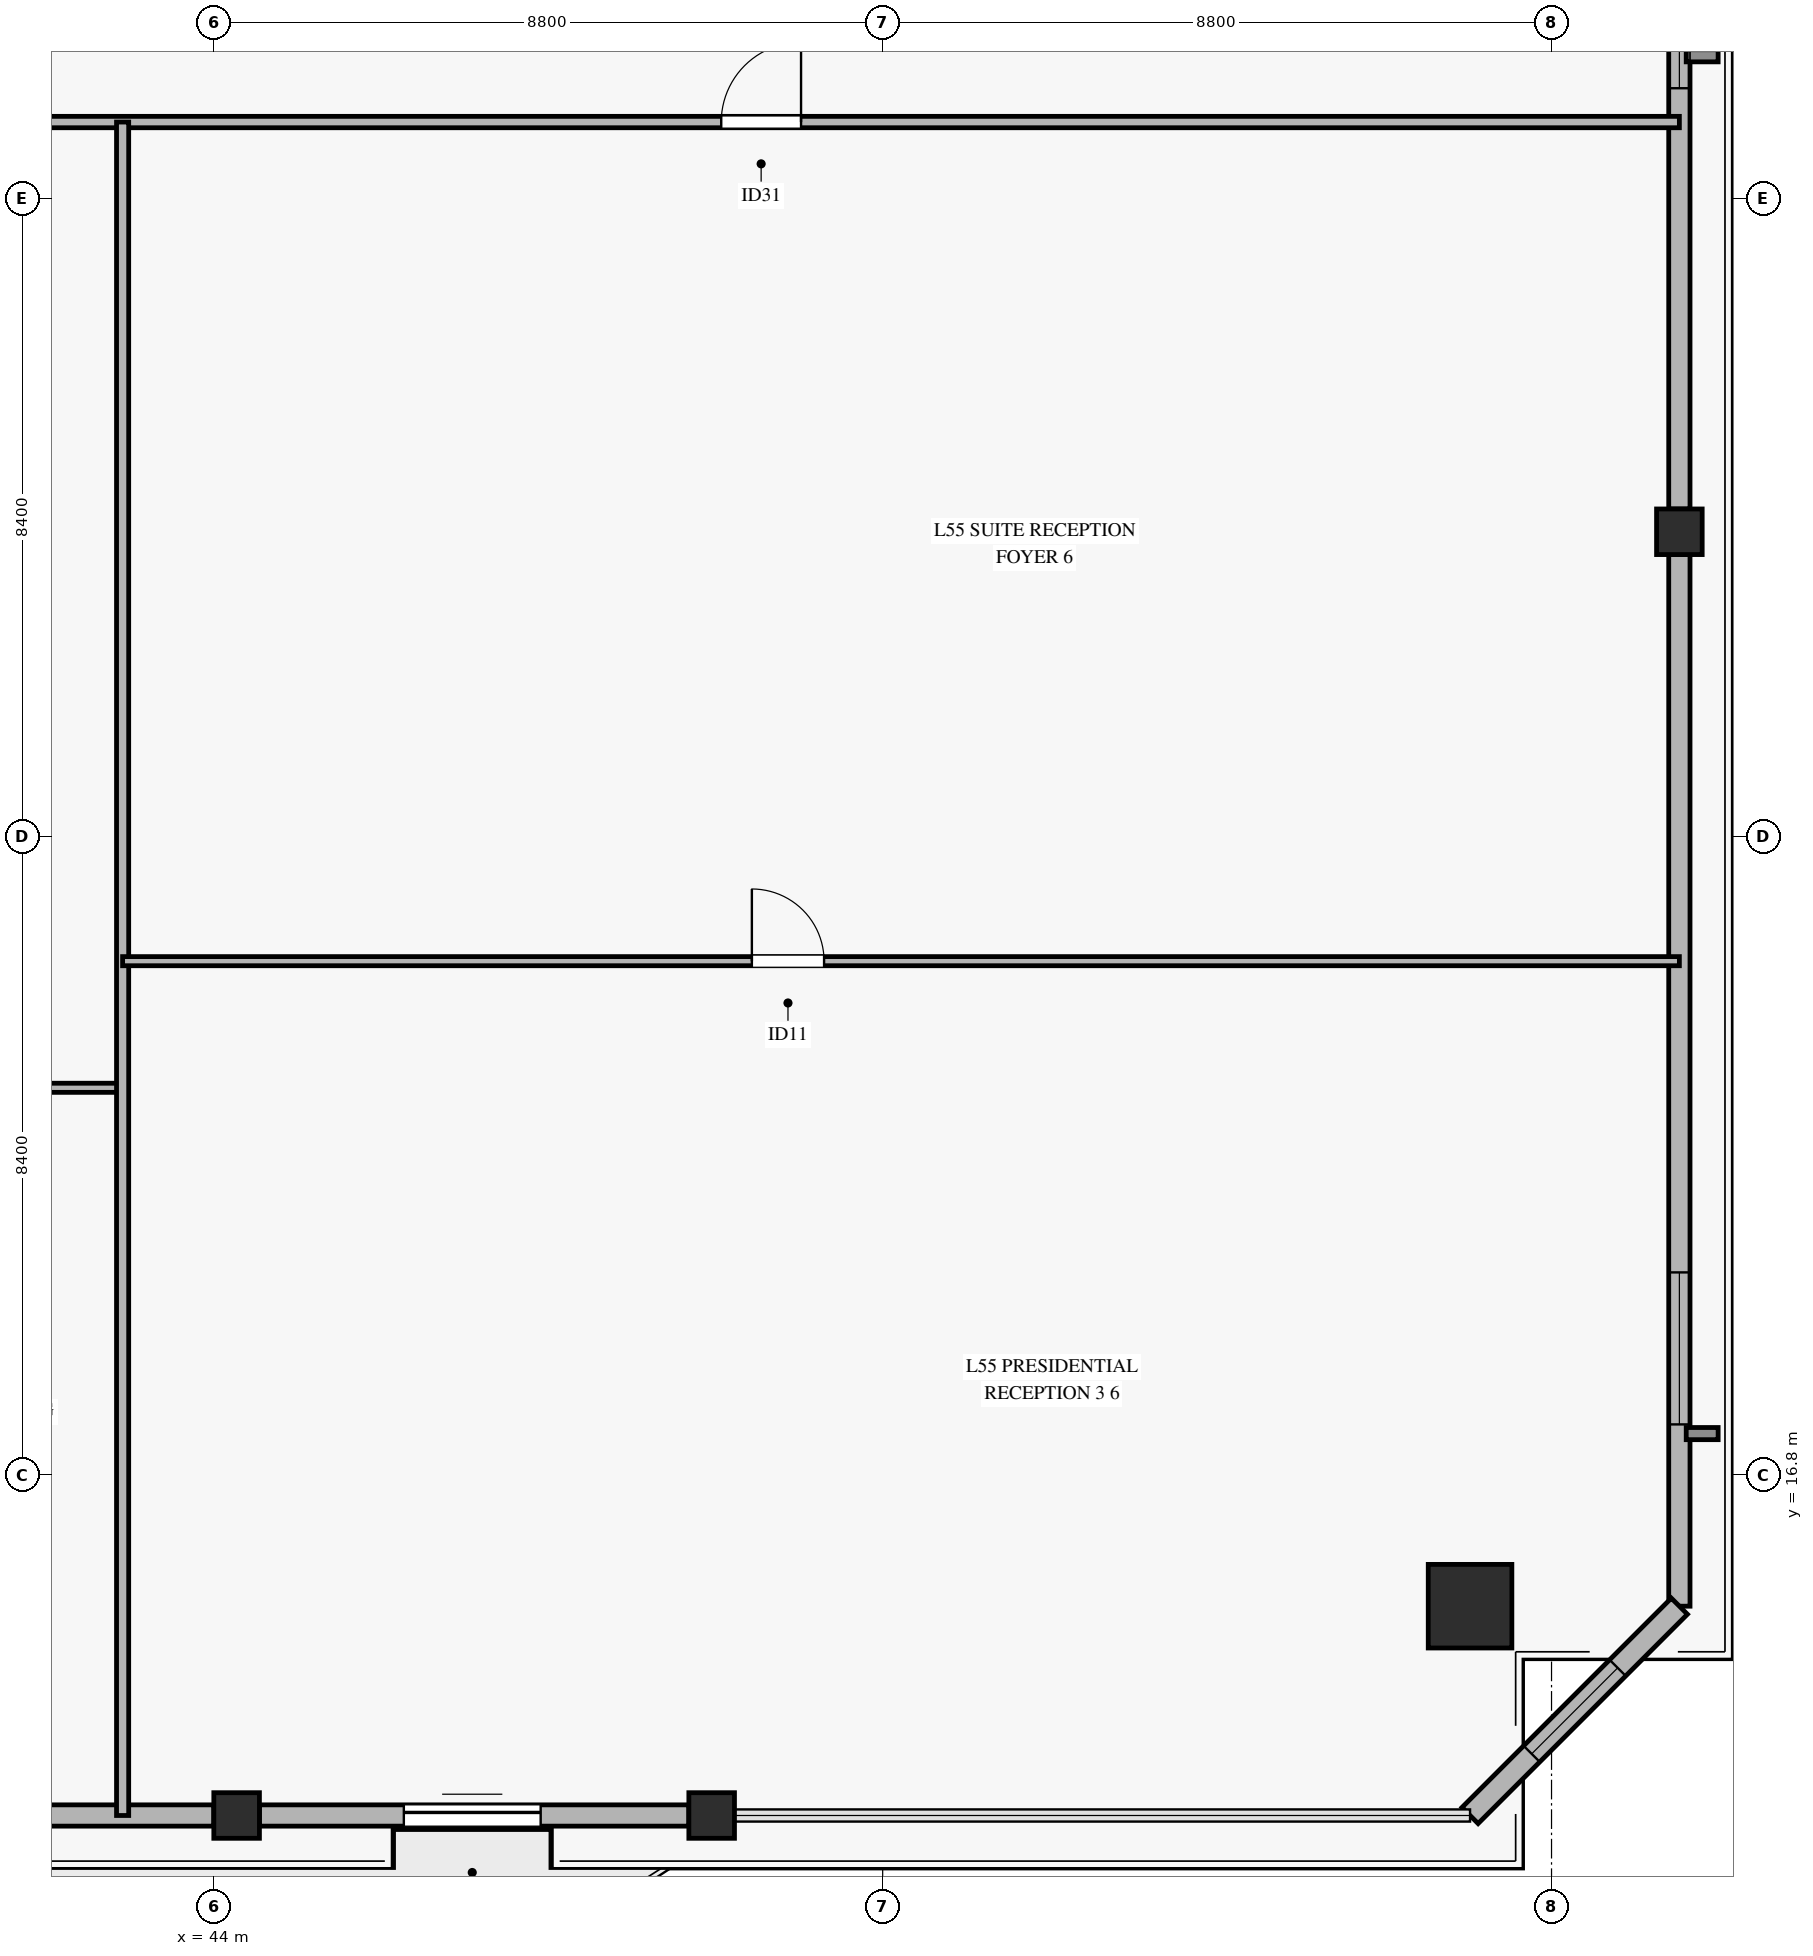
"""IFC4 building model, lengths in metres.
Left out: names, types, materials, properties, quantities, classifications, styles, units other than length and angle.
Written with IfcOpenShell. Run it as: python <this file> out.ifc"""

import sys

from ifc_helpers import new_model, si_unit, direction, frame, frame_2d, origin, origin_2d, place, context, subcontext, project, spatial, rectangle, hollow_rectangle, extrude, source, transform, mapped, element, fill, save


model = new_model("IFC4")
c1 = context("Model", 3, precision=1e-05, world=origin(), true_north=direction((0.0, 1.0)))
c2 = subcontext(c1, "Body", "Model", "MODEL_VIEW")
j1 = project(units=[si_unit("LENGTHUNIT", "METRE"), si_unit("PLANEANGLEUNIT", "RADIAN")], contexts=[c1])
p1 = place(None, origin())
s1 = spatial("IfcSite", under=j1, at=p1, CompositionType="ELEMENT")
p2 = place(p1, origin())
s2 = spatial("IfcBuilding", under=s1, at=p2, CompositionType="ELEMENT")
p3 = place(p2, frame((0.0, 0.0, 216.7)))
s3 = spatial("IfcBuildingStorey", under=s2, at=p3, CompositionType="ELEMENT", Elevation=216.7)
m1 = source(origin(), c2, "Body", "SweptSolid", [
    extrude(hollow_rectangle(XDim=1.1, YDim=1.1, WallThickness=0.05, at=origin_2d()), origin(), (0.0, 0.0, 1.0), 3.24),
])
p4 = place(p3, frame((60.528, 15.072, 0.0), z_axis=(0.0, 0.0, 1.0), x_axis=(1.0, 0.0, 0.0)))
e1 = element("IfcColumn", 1, at=p4, inside=s3, PredefinedType="COLUMN", context=c2, shape_type="MappedRepresentation", body=[
    mapped(m1, transform((0.0, 0.0, 0.0), x_axis=(1.0, 0.0, 0.0), y_axis=(0.0, 1.0, 0.0), z_axis=(0.0, 0.0, 1.0), scale=1.0)),
])
m2 = source(origin(), c2, "Body", "SweptSolid", [
    extrude(hollow_rectangle(XDim=0.6, YDim=0.6, WallThickness=0.028, at=origin_2d()), origin(), (0.0, 0.0, 1.0), 3.24),
])
for number, where, z_axis, x_axis in (
    (2, (44.3, 12.318, 0.0), (0.0, 0.0, 1.0), (1.0, 0.0, 0.0)),
    (3, (50.55, 12.318, 0.0), (0.0, 0.0, 1.0), (1.0, 0.0, 0.0)),
    (4, (63.282, 29.209, 0.0), (0.0, 0.0, 1.0), (1.0, 0.0, 0.0)),
):
    element("IfcColumn", number, at=place(p3, frame(where, z_axis=z_axis, x_axis=x_axis)), inside=s3, PredefinedType="COLUMN", context=c2, shape_type="MappedRepresentation", body=[
        mapped(m2, transform((0.0, 0.0, 0.0), x_axis=(1.0, 0.0, 0.0), y_axis=(0.0, 1.0, 0.0), z_axis=(0.0, 0.0, 1.0), scale=1.0)),
    ])
p5 = place(p3, frame((37.85, 12.318, 0.0), z_axis=(0.0, 0.0, 1.0), x_axis=(1.0, 0.0, 0.0)))
e5 = element("IfcWall", 5, at=p5, inside=s3, PredefinedType="SOLIDWALL", context=c2, shape_type="SweptSolid", body=[
    extrude(rectangle(XDim=6.15, YDim=0.28, at=frame_2d((3.075, 0.0))), origin(), (0.0, 0.0, 1.0), 2.72),
])
p6 = place(p3, frame((44.6, 12.318, 0.0), z_axis=(0.0, 0.0, 1.0), x_axis=(1.0, 0.0, 0.0)))
e6 = element("IfcWall", 6, at=p6, inside=s3, PredefinedType="SOLIDWALL", context=c2, shape_type="SweptSolid", body=[
    extrude(rectangle(XDim=5.65, YDim=0.28, at=frame_2d((2.825, 0.0))), origin(), (0.0, 0.0, 1.0), 2.72),
])
p7 = place(p6, frame((1.9, 0.0, 0.0)))
e7 = element("IfcOpeningElement", 7, at=p7, cuts=e6, PredefinedType="OPENING", context=c2, shape_type="SweptSolid", body=[
    extrude(rectangle(XDim=1.8, YDim=2.25, at=frame_2d((0.9, 1.125))), frame((0.0, 0.15, 0.0), z_axis=(0.0, -1.0, 0.0), x_axis=(1.0, 0.0, 0.0)), (0.0, 0.0, 1.0), 0.3),
])
p8 = place(p3, frame((63.282, 15.072, 0.0), z_axis=(0.0, 0.0, 1.0), x_axis=(0.0, 1.0, 0.0)))
e8 = element("IfcWall", 8, at=p8, inside=s3, PredefinedType="SOLIDWALL", context=c2, shape_type="SweptSolid", body=[
    extrude(rectangle(XDim=13.837, YDim=0.28, at=frame_2d((6.918, 0.0))), origin(), (0.0, 0.0, 1.0), 2.72),
])
p9 = place(p8, frame((2.392, 0.0, 0.45)))
e9 = element("IfcOpeningElement", 9, at=p9, cuts=e8, PredefinedType="OPENING", context=c2, shape_type="SweptSolid", body=[
    extrude(rectangle(XDim=2.0, YDim=2.0, at=frame_2d((1.0, 1.0))), frame((0.0, 0.15, 0.0), z_axis=(0.0, -1.0, 0.0), x_axis=(1.0, 0.0, 0.0)), (0.0, 0.0, 1.0), 0.3),
])
p10 = place(p3, frame((63.282, 29.509, 0.0), z_axis=(0.0, 0.0, 1.0), x_axis=(0.0, 1.0, 0.0)))
e10 = element("IfcWall", 10, at=p10, inside=s3, PredefinedType="SOLIDWALL", context=c2, shape_type="SweptSolid", body=[
    extrude(rectangle(XDim=13.837, YDim=0.28, at=frame_2d((6.918, 0.0))), origin(), (0.0, 0.0, 1.0), 2.72),
])
p11 = place(p10, frame((5.536, 0.0, 0.45)))
e11 = element("IfcOpeningElement", 11, at=p11, cuts=e10, PredefinedType="OPENING", context=c2, shape_type="SweptSolid", body=[
    extrude(rectangle(XDim=2.0, YDim=2.0, at=frame_2d((1.0, 1.0))), frame((0.0, 0.15, 0.0), z_axis=(0.0, -1.0, 0.0), x_axis=(1.0, 0.0, 0.0)), (0.0, 0.0, 1.0), 0.3),
])
p12 = place(p3, frame((60.528, 12.318, 0.0), z_axis=(0.0, 0.0, 1.0), x_axis=(0.707106781187, 0.707106781187, 0.0)))
e12 = element("IfcWall", 12, at=p12, inside=s3, PredefinedType="SOLIDWALL", context=c2, shape_type="SweptSolid", body=[
    extrude(rectangle(XDim=3.895, YDim=0.3, at=frame_2d((1.947, 0.0))), origin(), (0.0, 0.0, 1.0), 2.72),
])
p13 = place(p12, frame((1.147, 0.0, 0.45)))
e13 = element("IfcOpeningElement", 13, at=p13, cuts=e12, PredefinedType="OPENING", context=c2, shape_type="SweptSolid", body=[
    extrude(rectangle(XDim=1.6, YDim=2.0, at=frame_2d((0.8, 1.0))), frame((0.0, 0.16, 0.0), z_axis=(0.0, -1.0, 0.0), x_axis=(1.0, 0.0, 0.0)), (0.0, 0.0, 1.0), 0.32),
])
p14 = place(p3, frame((7.118, 34.6, 0.0), z_axis=(0.0, 0.0, 1.0), x_axis=(1.0, 0.0, 0.0)))
e14 = element("IfcWall", 14, at=p14, inside=s3, PredefinedType="PARTITIONING", context=c2, shape_type="SweptSolid", body=[
    extrude(rectangle(XDim=56.164, YDim=0.15, at=frame_2d((28.082, 0.0))), origin(), (0.0, 0.0, 1.0), 2.425),
])
p15 = place(p14, frame((6.024, 0.0, 0.0)))
e15 = element("IfcOpeningElement", 15, at=p15, cuts=e14, PredefinedType="OPENING", context=c2, shape_type="SweptSolid", body=[
    extrude(rectangle(XDim=1.05, YDim=2.15, at=frame_2d((0.525, 1.075))), frame((0.0, 0.085, 0.0), z_axis=(0.0, -1.0, 0.0), x_axis=(1.0, 0.0, 0.0)), (0.0, 0.0, 1.0), 0.17),
])
p16 = place(p14, frame((17.379, 0.0, 0.0)))
e16 = element("IfcOpeningElement", 16, at=p16, cuts=e14, PredefinedType="OPENING", context=c2, shape_type="SweptSolid", body=[
    extrude(rectangle(XDim=1.05, YDim=2.15, at=frame_2d((0.525, 1.075))), frame((0.0, 0.085, 0.0), z_axis=(0.0, -1.0, 0.0), x_axis=(1.0, 0.0, 0.0)), (0.0, 0.0, 1.0), 0.17),
])
p17 = place(p14, frame((22.751, 0.0, 0.0)))
e17 = element("IfcOpeningElement", 17, at=p17, cuts=e14, PredefinedType="OPENING", context=c2, shape_type="SweptSolid", body=[
    extrude(rectangle(XDim=1.05, YDim=2.15, at=frame_2d((0.525, 1.075))), frame((0.0, 0.085, 0.0), z_axis=(0.0, -1.0, 0.0), x_axis=(1.0, 0.0, 0.0)), (0.0, 0.0, 1.0), 0.17),
])
p18 = place(p14, frame((28.038, 0.0, 0.0)))
e18 = element("IfcOpeningElement", 18, at=p18, cuts=e14, PredefinedType="OPENING", context=c2, shape_type="SweptSolid", body=[
    extrude(rectangle(XDim=1.05, YDim=2.15, at=frame_2d((0.525, 1.075))), frame((0.0, 0.085, 0.0), z_axis=(0.0, -1.0, 0.0), x_axis=(1.0, 0.0, 0.0)), (0.0, 0.0, 1.0), 0.17),
])
p19 = place(p14, frame((33.038, 0.0, 0.0)))
e19 = element("IfcOpeningElement", 19, at=p19, cuts=e14, PredefinedType="OPENING", context=c2, shape_type="SweptSolid", body=[
    extrude(rectangle(XDim=1.05, YDim=2.15, at=frame_2d((0.525, 1.075))), frame((0.0, 0.085, 0.0), z_axis=(0.0, -1.0, 0.0), x_axis=(1.0, 0.0, 0.0)), (0.0, 0.0, 1.0), 0.17),
])
p20 = place(p14, frame((43.558, 0.0, 0.0)))
e20 = element("IfcOpeningElement", 20, at=p20, cuts=e14, PredefinedType="OPENING", context=c2, shape_type="SweptSolid", body=[
    extrude(rectangle(XDim=1.05, YDim=2.15, at=frame_2d((0.525, 1.075))), frame((0.0, 0.085, 0.0), z_axis=(0.0, -1.0, 0.0), x_axis=(1.0, 0.0, 0.0)), (0.0, 0.0, 1.0), 0.17),
])
p21 = place(p3, frame((37.8, 21.893, 0.0), z_axis=(0.0, 0.0, 1.0), x_axis=(1.0, 0.0, 0.0)))
e21 = element("IfcWall", 21, at=p21, inside=s3, PredefinedType="PARTITIONING", context=c2, shape_type="SweptSolid", body=[
    extrude(rectangle(XDim=5.0, YDim=0.12, at=frame_2d((2.5, 0.0))), origin(), (0.0, 0.0, 1.0), 3.24),
])
p22 = place(p21, frame((2.225, 0.0, 0.0)))
e22 = element("IfcOpeningElement", 22, at=p22, cuts=e21, PredefinedType="OPENING", context=c2, shape_type="SweptSolid", body=[
    extrude(rectangle(XDim=0.95, YDim=2.1, at=frame_2d((0.475, 1.05))), frame((0.0, 0.07, 0.0), z_axis=(0.0, -1.0, 0.0), x_axis=(1.0, 0.0, 0.0)), (0.0, 0.0, 1.0), 0.14),
])
p23 = place(p3, frame((42.8, 12.318, 0.0), z_axis=(0.0, 0.0, 1.0), x_axis=(0.0, 1.0, 0.0)))
e23 = element("IfcWall", 23, at=p23, inside=s3, PredefinedType="PARTITIONING", context=c2, shape_type="SweptSolid", body=[
    extrude(rectangle(XDim=22.282, YDim=0.16, at=frame_2d((11.141, 0.0))), origin(), (0.0, 0.0, 1.0), 2.725),
])
p24 = place(p3, frame((42.8, 23.559, 0.0), z_axis=(0.0, 0.0, 1.0), x_axis=(1.0, 0.0, 0.0)))
e24 = element("IfcWall", 24, at=p24, inside=s3, PredefinedType="PARTITIONING", context=c2, shape_type="SweptSolid", body=[
    extrude(rectangle(XDim=20.482, YDim=0.12, at=frame_2d((10.241, 0.0))), origin(), (0.0, 0.0, 1.0), 2.425),
])
p25 = place(p24, frame((8.279, 0.0, 0.0)))
e25 = element("IfcOpeningElement", 25, at=p25, cuts=e24, PredefinedType="OPENING", context=c2, shape_type="SweptSolid", body=[
    extrude(rectangle(XDim=0.95, YDim=2.1, at=frame_2d((0.475, 1.05))), frame((0.0, 0.07, 0.0), z_axis=(0.0, -1.0, 0.0), x_axis=(1.0, 0.0, 0.0)), (0.0, 0.0, 1.0), 0.14),
])
m3 = source(origin(), c2, "Body", "SweptSolid", [
    extrude(rectangle(XDim=1.8, YDim=2.25, at=frame_2d((0.9, 1.125))), frame((0.0, 0.025, 0.0), z_axis=(0.0, -1.0, 0.0), x_axis=(1.0, 0.0, 0.0)), (0.0, 0.0, 1.0), 0.05),
])
p26 = place(p7, origin())
e26 = element("IfcDoor", 26, at=p26, inside=s3, OperationType="SLIDING_TO_LEFT", PredefinedType="DOOR", context=c2, shape_type="MappedRepresentation", body=[
    mapped(m3, transform((0.0, 0.0, 0.0), x_axis=(1.0, 0.0, 0.0), y_axis=(0.0, 1.0, 0.0), z_axis=(0.0, 0.0, 1.0), scale=1.0)),
])
fill(e7, e26)
m4 = source(origin(), c2, "Body", "SweptSolid", [
    extrude(rectangle(XDim=2.0, YDim=2.0, at=frame_2d((1.0, 1.0))), frame((0.0, 0.03, 0.0), z_axis=(0.0, -1.0, 0.0), x_axis=(1.0, 0.0, 0.0)), (0.0, 0.0, 1.0), 0.06),
])
p27 = place(p9, origin())
e27 = element("IfcWindow", 27, at=p27, inside=s3, PartitioningType="SINGLE_PANEL", PredefinedType="WINDOW", context=c2, shape_type="MappedRepresentation", body=[
    mapped(m4, transform((0.0, 0.0, 0.0), x_axis=(1.0, 0.0, 0.0), y_axis=(0.0, 1.0, 0.0), z_axis=(0.0, 0.0, 1.0), scale=1.0)),
])
fill(e9, e27)
p28 = place(p11, origin())
e28 = element("IfcWindow", 28, at=p28, inside=s3, PartitioningType="SINGLE_PANEL", PredefinedType="WINDOW", context=c2, shape_type="MappedRepresentation", body=[
    mapped(m4, transform((0.0, 0.0, 0.0), x_axis=(1.0, 0.0, 0.0), y_axis=(0.0, 1.0, 0.0), z_axis=(0.0, 0.0, 1.0), scale=1.0)),
])
fill(e11, e28)
m5 = source(origin(), c2, "Body", "SweptSolid", [
    extrude(rectangle(XDim=1.6, YDim=2.0, at=frame_2d((0.8, 1.0))), frame((0.0, 0.03, 0.0), z_axis=(0.0, -1.0, 0.0), x_axis=(1.0, 0.0, 0.0)), (0.0, 0.0, 1.0), 0.06),
])
p29 = place(p13, origin())
e29 = element("IfcWindow", 29, at=p29, inside=s3, PartitioningType="SINGLE_PANEL", PredefinedType="WINDOW", context=c2, shape_type="MappedRepresentation", body=[
    mapped(m5, transform((0.0, 0.0, 0.0), x_axis=(1.0, 0.0, 0.0), y_axis=(0.0, 1.0, 0.0), z_axis=(0.0, 0.0, 1.0), scale=1.0)),
])
fill(e13, e29)
m6 = source(origin(), c2, "Body", "SweptSolid", [
    extrude(rectangle(XDim=1.05, YDim=2.15, at=frame_2d((0.525, 1.075))), frame((0.0, 0.025, 0.0), z_axis=(0.0, -1.0, 0.0), x_axis=(1.0, 0.0, 0.0)), (0.0, 0.0, 1.0), 0.05),
])
p30 = place(p20, origin())
e30 = element("IfcDoor", 30, at=p30, inside=s3, OperationType="SINGLE_SWING_RIGHT", PredefinedType="DOOR", context=c2, shape_type="MappedRepresentation", body=[
    mapped(m6, transform((0.0, 0.0, 0.0), x_axis=(1.0, 0.0, 0.0), y_axis=(0.0, 1.0, 0.0), z_axis=(0.0, 0.0, 1.0), scale=1.0)),
])
fill(e20, e30)
m7 = source(origin(), c2, "Body", "SweptSolid", [
    extrude(rectangle(XDim=0.95, YDim=2.1, at=frame_2d((0.475, 1.05))), frame((0.0, 0.025, 0.0), z_axis=(0.0, -1.0, 0.0), x_axis=(1.0, 0.0, 0.0)), (0.0, 0.0, 1.0), 0.05),
])
p31 = place(p25, origin())
e31 = element("IfcDoor", 31, at=p31, inside=s3, OperationType="SINGLE_SWING_LEFT", PredefinedType="DOOR", context=c2, shape_type="MappedRepresentation", body=[
    mapped(m7, transform((0.0, 0.0, 0.0), x_axis=(1.0, 0.0, 0.0), y_axis=(0.0, 1.0, 0.0), z_axis=(0.0, 0.0, 1.0), scale=1.0)),
])
fill(e25, e31)
save(model, sys.argv[1])
